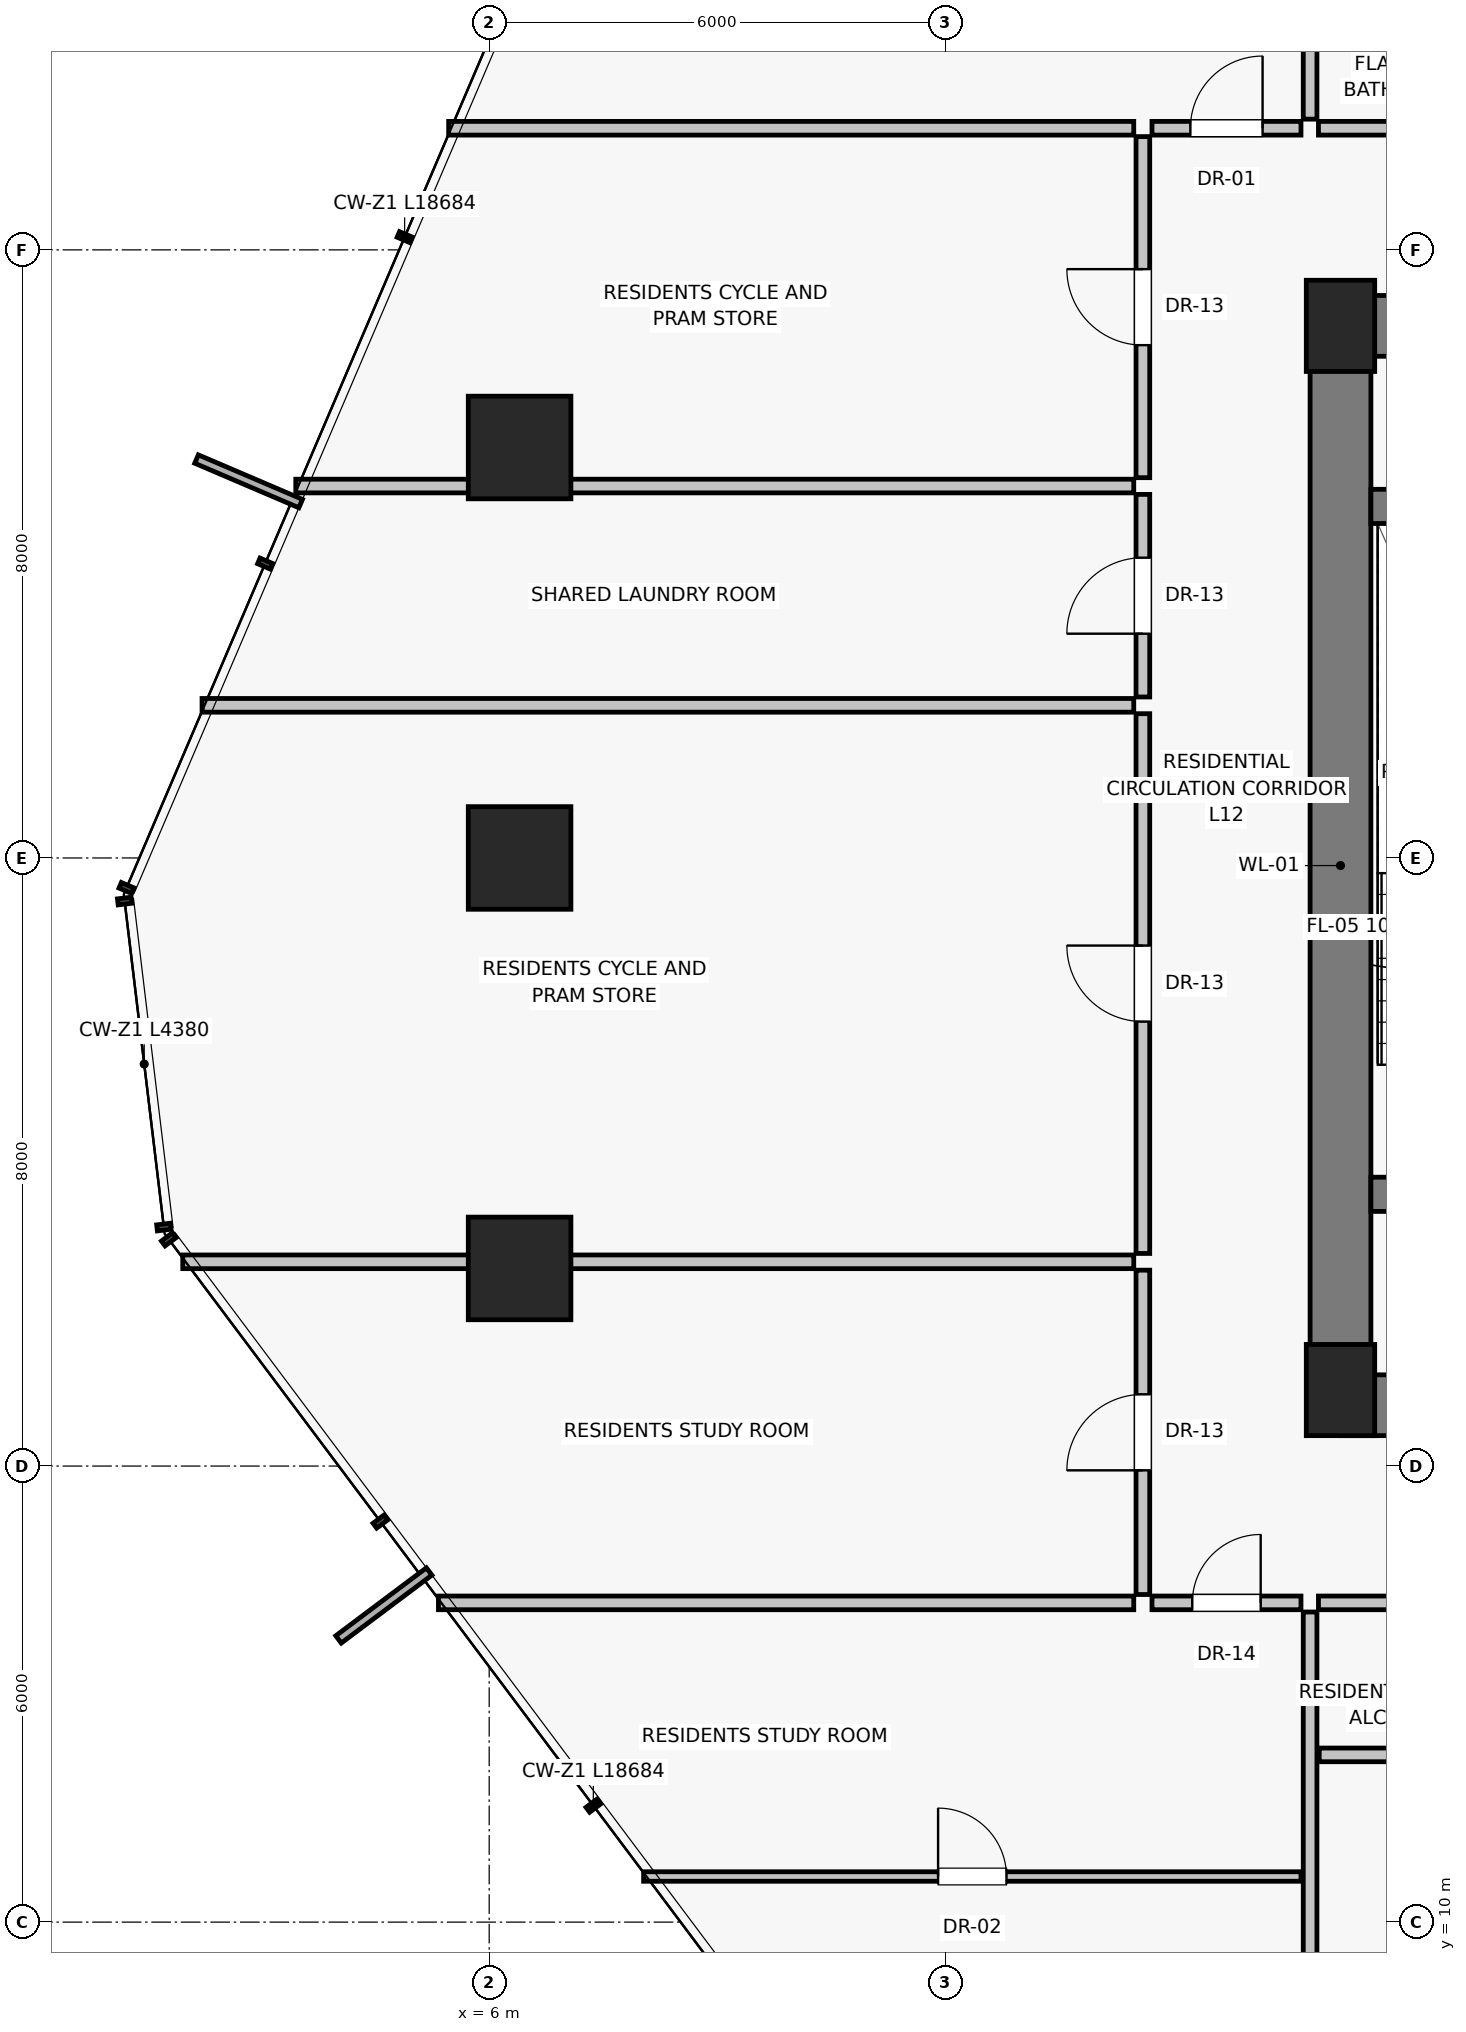
"""IFC4 building model, lengths in metres.
Left out: names, types, materials, properties, quantities, classifications, styles, units other than length and angle.
Written with IfcOpenShell. Run it as: python <this file> out.ifc"""

import sys

from ifc_helpers import new_model, si_unit, direction, frame, frame_2d, origin, origin_2d, place, context, subcontext, project, spatial, rectangle, extrude, source, transform, mapped, element, fill, save


model = new_model("IFC4")
c1 = context("Model", 3, precision=1e-05, world=origin(), true_north=direction((0.0, 1.0)))
c2 = subcontext(c1, "Body", "Model", "MODEL_VIEW")
j1 = project(units=[si_unit("LENGTHUNIT", "METRE"), si_unit("PLANEANGLEUNIT", "RADIAN")], contexts=[c1])
p1 = place(None, origin())
s1 = spatial("IfcSite", under=j1, at=p1, CompositionType="ELEMENT")
p2 = place(p1, origin())
s2 = spatial("IfcBuilding", under=s1, at=p2, CompositionType="ELEMENT")
p3 = place(p2, frame((0.0, 0.0, 46.8)))
s3 = spatial("IfcBuildingStorey", under=s2, at=p3, CompositionType="ELEMENT", Elevation=46.8)
for number, where, z_axis, x_axis in (
    (1, (17.2, 17.0, 0.0), (0.0, 0.0, 1.0), (1.0, 0.0, 0.0)),
    (2, (17.2, 31.0, 0.0), (0.0, 0.0, 1.0), (1.0, 0.0, 0.0)),
):
    element("IfcColumn", number, at=place(p3, frame(where, z_axis=z_axis, x_axis=x_axis)), inside=s3, PredefinedType="PILASTER", context=c2, shape_type="SweptSolid", body=[
        extrude(rectangle(XDim=0.9, YDim=1.2, at=origin_2d()), origin(), (0.0, 0.0, 1.0), 3.25),
    ])
for number, where, z_axis, x_axis in (
    (3, (6.4, 29.4, 0.0), (0.0, 0.0, 1.0), (1.0, 0.0, 0.0)),
    (4, (6.4, 24.0, 0.0), (0.0, 0.0, 1.0), (1.0, 0.0, 0.0)),
    (5, (6.4, 18.6, 0.0), (0.0, 0.0, 1.0), (1.0, 0.0, 0.0)),
):
    element("IfcColumn", number, at=place(p3, frame(where, z_axis=z_axis, x_axis=x_axis)), inside=s3, PredefinedType="COLUMN", context=c2, shape_type="SweptSolid", body=[
        extrude(rectangle(XDim=1.35, YDim=1.35, at=origin_2d()), origin(), (0.0, 0.0, 1.0), 3.25),
    ])
p4 = place(p3, frame((17.2, 16.8, 0.0), z_axis=(0.0, 0.0, 1.0), x_axis=(0.0, 1.0, 0.0)))
e6 = element("IfcWall", 6, at=p4, inside=s3, PredefinedType="SHEAR", context=c2, shape_type="SweptSolid", body=[
    extrude(rectangle(XDim=14.2, YDim=0.8, at=frame_2d((7.1, 0.0))), origin(), (0.0, 0.0, 1.0), 3.0),
])
p5 = place(p3, frame((17.2, 16.8, 0.0), z_axis=(0.0, 0.0, 1.0), x_axis=(1.0, 0.0, 0.0)))
e7 = element("IfcWall", 7, at=p5, inside=s3, PredefinedType="SHEAR", context=c2, shape_type="SweptSolid", body=[
    extrude(rectangle(XDim=5.85, YDim=0.8, at=frame_2d((2.925, 0.0))), origin(), (0.0, 0.0, 1.0), 3.0),
])
p6 = place(p5, frame((1.15, 0.0, 0.0)))
e8 = element("IfcOpeningElement", 8, at=p6, cuts=e7, PredefinedType="OPENING", context=c2, shape_type="SweptSolid", body=[
    extrude(rectangle(XDim=1.2, YDim=2.03, at=frame_2d((0.6, 1.015))), frame((0.0, 0.41, 0.0), z_axis=(0.0, -1.0, 0.0), x_axis=(1.0, 0.0, 0.0)), (0.0, 0.0, 1.0), 0.82),
])
p7 = place(p3, frame((17.2, 31.0, 0.0), z_axis=(0.0, 0.0, 1.0), x_axis=(1.0, 0.0, 0.0)))
e9 = element("IfcWall", 9, at=p7, inside=s3, PredefinedType="SHEAR", context=c2, shape_type="SweptSolid", body=[
    extrude(rectangle(XDim=3.8, YDim=0.8, at=frame_2d((1.9, 0.0))), origin(), (0.0, 0.0, 1.0), 3.0),
])
p8 = place(p7, frame((1.25, 0.0, 0.0)))
e10 = element("IfcOpeningElement", 10, at=p8, cuts=e9, PredefinedType="OPENING", context=c2, shape_type="SweptSolid", body=[
    extrude(rectangle(XDim=0.86, YDim=2.01, at=frame_2d((0.43, 1.005))), frame((0.0, 0.41, 0.0), z_axis=(0.0, -1.0, 0.0), x_axis=(1.0, 0.0, 0.0)), (0.0, 0.0, 1.0), 0.82),
])
p9 = place(p3, frame((17.6, 19.575, 0.0), z_axis=(0.0, 0.0, 1.0), x_axis=(1.0, 0.0, 0.0)))
e11 = element("IfcWall", 11, at=p9, inside=s3, PredefinedType="SHEAR", context=c2, shape_type="SweptSolid", body=[
    extrude(rectangle(XDim=3.425, YDim=0.45, at=frame_2d((1.712, 0.0))), origin(), (0.0, 0.0, 1.0), 3.0),
])
p10 = place(p9, frame((1.05, 0.0, 0.0)))
e12 = element("IfcOpeningElement", 12, at=p10, cuts=e11, PredefinedType="OPENING", context=c2, shape_type="SweptSolid", body=[
    extrude(rectangle(XDim=1.1, YDim=2.03, at=frame_2d((0.55, 1.015))), frame((0.0, 0.235, 0.0), z_axis=(0.0, -1.0, 0.0), x_axis=(1.0, 0.0, 0.0)), (0.0, 0.0, 1.0), 0.47),
])
p11 = place(p3, frame((17.6, 28.625, 0.0), z_axis=(0.0, 0.0, 1.0), x_axis=(1.0, 0.0, 0.0)))
e13 = element("IfcWall", 13, at=p11, inside=s3, PredefinedType="SHEAR", context=c2, shape_type="SweptSolid", body=[
    extrude(rectangle(XDim=3.425, YDim=0.45, at=frame_2d((1.712, 0.0))), origin(), (0.0, 0.0, 1.0), 3.0),
])
p12 = place(p3, frame((16.8, 14.08, 0.0), z_axis=(0.0, 0.0, 1.0), x_axis=(0.0, -1.0, 0.0)))
e14 = element("IfcWall", 14, at=p12, inside=s3, PredefinedType="PARTITIONING", context=c2, shape_type="SweptSolid", body=[
    extrude(rectangle(XDim=11.723, YDim=0.18, at=frame_2d((5.861, 0.0))), origin(), (0.0, 0.0, 1.0), 3.0),
])
p13 = place(p3, frame((16.91, 14.2, 0.0), z_axis=(0.0, 0.0, 1.0), x_axis=(1.0, 0.0, 0.0)))
e15 = element("IfcWall", 15, at=p13, inside=s3, PredefinedType="PARTITIONING", context=c2, shape_type="SweptSolid", body=[
    extrude(rectangle(XDim=4.1, YDim=0.18, at=frame_2d((2.05, 0.0))), origin(), (0.0, 0.0, 1.0), 3.0),
])
p14 = place(p13, frame((1.55, 0.0, 0.0)))
e16 = element("IfcOpeningElement", 16, at=p14, cuts=e15, PredefinedType="OPENING", context=c2, shape_type="SweptSolid", body=[
    extrude(rectangle(XDim=1.0, YDim=2.01, at=frame_2d((0.5, 1.005))), frame((0.0, 0.1, 0.0), z_axis=(0.0, -1.0, 0.0), x_axis=(1.0, 0.0, 0.0)), (0.0, 0.0, 1.0), 0.2),
])
p15 = place(p3, frame((16.92, 12.2, 0.0), z_axis=(0.0, 0.0, 1.0), x_axis=(1.0, 0.0, 0.0)))
e17 = element("IfcWall", 17, at=p15, inside=s3, PredefinedType="PARTITIONING", context=c2, shape_type="SweptSolid", body=[
    extrude(rectangle(XDim=4.1, YDim=0.18, at=frame_2d((2.05, 0.0))), origin(), (0.0, 0.0, 1.0), 3.0),
])
p16 = place(p3, frame((16.8, 33.72, 0.0), z_axis=(0.0, 0.0, 1.0), x_axis=(0.0, 1.0, 0.0)))
e18 = element("IfcWall", 18, at=p16, inside=s3, PredefinedType="PARTITIONING", context=c2, shape_type="SweptSolid", body=[
    extrude(rectangle(XDim=10.378, YDim=0.18, at=frame_2d((5.189, 0.0))), origin(), (0.0, 0.0, 1.0), 3.0),
])
p17 = place(p3, frame((16.91, 33.6, 0.0), z_axis=(0.0, 0.0, 1.0), x_axis=(1.0, 0.0, 0.0)))
e19 = element("IfcWall", 19, at=p17, inside=s3, PredefinedType="PARTITIONING", context=c2, shape_type="SweptSolid", body=[
    extrude(rectangle(XDim=5.788, YDim=0.18, at=frame_2d((2.894, 0.0))), origin(), (0.0, 0.0, 1.0), 3.0),
])
p18 = place(p17, frame((3.484, 0.0, 0.0)))
e20 = element("IfcOpeningElement", 20, at=p18, cuts=e19, PredefinedType="OPENING", context=c2, shape_type="SweptSolid", body=[
    extrude(rectangle(XDim=0.95, YDim=2.02, at=frame_2d((0.475, 1.01))), frame((0.0, 0.1, 0.0), z_axis=(0.0, -1.0, 0.0), x_axis=(1.0, 0.0, 0.0)), (0.0, 0.0, 1.0), 0.2),
])
p19 = place(p3, frame((14.48, 14.2, 0.0), z_axis=(0.0, 0.0, 1.0), x_axis=(-1.0, 0.0, 0.0)))
e21 = element("IfcWall", 21, at=p19, inside=s3, PredefinedType="PARTITIONING", context=c2, shape_type="SweptSolid", body=[
    extrude(rectangle(XDim=9.147, YDim=0.18, at=frame_2d((4.574, 0.0))), origin(), (0.0, 0.0, 1.0), 3.0),
])
p20 = place(p3, frame((14.48, 33.6, 0.0), z_axis=(0.0, 0.0, 1.0), x_axis=(-1.0, 0.0, 0.0)))
e22 = element("IfcWall", 22, at=p20, inside=s3, PredefinedType="PARTITIONING", context=c2, shape_type="SweptSolid", body=[
    extrude(rectangle(XDim=9.013, YDim=0.18, at=frame_2d((4.507, 0.0))), origin(), (0.0, 0.0, 1.0), 3.0),
])
p21 = place(p3, frame((14.6, 14.31, 0.0), z_axis=(0.0, 0.0, 1.0), x_axis=(0.0, 1.0, 0.0)))
e23 = element("IfcWall", 23, at=p21, inside=s3, PredefinedType="PARTITIONING", context=c2, shape_type="SweptSolid", body=[
    extrude(rectangle(XDim=4.267, YDim=0.18, at=frame_2d((2.133, 0.0))), origin(), (0.0, 0.0, 1.0), 3.0),
])
p22 = place(p21, frame((1.634, 0.0, 0.0)))
e24 = element("IfcOpeningElement", 24, at=p22, cuts=e23, PredefinedType="OPENING", context=c2, shape_type="SweptSolid", body=[
    extrude(rectangle(XDim=1.0, YDim=2.01, at=frame_2d((0.5, 1.005))), frame((0.0, 0.1, 0.0), z_axis=(0.0, -1.0, 0.0), x_axis=(1.0, 0.0, 0.0)), (0.0, 0.0, 1.0), 0.2),
])
p23 = place(p3, frame((14.6, 18.797, 0.0), z_axis=(0.0, 0.0, 1.0), x_axis=(0.0, 1.0, 0.0)))
e25 = element("IfcWall", 25, at=p23, inside=s3, PredefinedType="PARTITIONING", context=c2, shape_type="SweptSolid", body=[
    extrude(rectangle(XDim=7.101, YDim=0.18, at=frame_2d((3.55, 0.0))), origin(), (0.0, 0.0, 1.0), 3.0),
])
p24 = place(p23, frame((3.051, 0.0, 0.0)))
e26 = element("IfcOpeningElement", 26, at=p24, cuts=e25, PredefinedType="OPENING", context=c2, shape_type="SweptSolid", body=[
    extrude(rectangle(XDim=1.0, YDim=2.01, at=frame_2d((0.5, 1.005))), frame((0.0, 0.1, 0.0), z_axis=(0.0, -1.0, 0.0), x_axis=(1.0, 0.0, 0.0)), (0.0, 0.0, 1.0), 0.2),
])
p25 = place(p3, frame((14.48, 18.687, 0.0), z_axis=(0.0, 0.0, 1.0), x_axis=(-1.0, 0.0, 0.0)))
e27 = element("IfcWall", 27, at=p25, inside=s3, PredefinedType="PARTITIONING", context=c2, shape_type="SweptSolid", body=[
    extrude(rectangle(XDim=12.511, YDim=0.18, at=frame_2d((6.256, 0.0))), origin(), (0.0, 0.0, 1.0), 2.299),
])
p26 = place(p3, frame((14.48, 26.008, 0.0), z_axis=(0.0, 0.0, 1.0), x_axis=(-1.0, 0.0, 0.0)))
e28 = element("IfcWall", 28, at=p26, inside=s3, PredefinedType="PARTITIONING", context=c2, shape_type="SweptSolid", body=[
    extrude(rectangle(XDim=12.258, YDim=0.18, at=frame_2d((6.129, 0.0))), origin(), (0.0, 0.0, 1.0), 3.0),
])
p27 = place(p3, frame((14.6, 26.118, 0.0), z_axis=(0.0, 0.0, 1.0), x_axis=(0.0, 1.0, 0.0)))
e29 = element("IfcWall", 29, at=p27, inside=s3, PredefinedType="PARTITIONING", context=c2, shape_type="SweptSolid", body=[
    extrude(rectangle(XDim=2.665, YDim=0.18, at=frame_2d((1.333, 0.0))), origin(), (0.0, 0.0, 1.0), 3.0),
])
p28 = place(p27, frame((0.833, 0.0, 0.0)))
e30 = element("IfcOpeningElement", 30, at=p28, cuts=e29, PredefinedType="OPENING", context=c2, shape_type="SweptSolid", body=[
    extrude(rectangle(XDim=1.0, YDim=2.01, at=frame_2d((0.5, 1.005))), frame((0.0, 0.1, 0.0), z_axis=(0.0, -1.0, 0.0), x_axis=(1.0, 0.0, 0.0)), (0.0, 0.0, 1.0), 0.2),
])
p29 = place(p3, frame((14.6, 29.003, 0.0), z_axis=(0.0, 0.0, 1.0), x_axis=(0.0, 1.0, 0.0)))
e31 = element("IfcWall", 31, at=p29, inside=s3, PredefinedType="PARTITIONING", context=c2, shape_type="SweptSolid", body=[
    extrude(rectangle(XDim=4.487, YDim=0.18, at=frame_2d((2.244, 0.0))), origin(), (0.0, 0.0, 1.0), 3.0),
])
p30 = place(p29, frame((1.743, 0.0, 0.0)))
e32 = element("IfcOpeningElement", 32, at=p30, cuts=e31, PredefinedType="OPENING", context=c2, shape_type="SweptSolid", body=[
    extrude(rectangle(XDim=1.0, YDim=2.01, at=frame_2d((0.5, 1.005))), frame((0.0, 0.1, 0.0), z_axis=(0.0, -1.0, 0.0), x_axis=(1.0, 0.0, 0.0)), (0.0, 0.0, 1.0), 0.2),
])
p31 = place(p3, frame((14.48, 28.893, 0.0), z_axis=(0.0, 0.0, 1.0), x_axis=(-1.0, 0.0, 0.0)))
e33 = element("IfcWall", 33, at=p31, inside=s3, PredefinedType="PARTITIONING", context=c2, shape_type="SweptSolid", body=[
    extrude(rectangle(XDim=11.025, YDim=0.18, at=frame_2d((5.512, 0.0))), origin(), (0.0, 0.0, 1.0), 2.299),
])
p32 = place(p3, frame((14.72, 14.2, 0.0), z_axis=(0.0, 0.0, 1.0), x_axis=(1.0, 0.0, 0.0)))
e34 = element("IfcWall", 34, at=p32, inside=s3, PredefinedType="PARTITIONING", context=c2, shape_type="SweptSolid", body=[
    extrude(rectangle(XDim=1.96, YDim=0.18, at=frame_2d((0.98, 0.0))), origin(), (0.0, 0.0, 1.0), 3.0),
])
p33 = place(p32, frame((0.53, 0.0, 0.0)))
e35 = element("IfcOpeningElement", 35, at=p33, cuts=e34, PredefinedType="OPENING", context=c2, shape_type="SweptSolid", body=[
    extrude(rectangle(XDim=0.9, YDim=2.01, at=frame_2d((0.45, 1.005))), frame((0.0, 0.1, 0.0), z_axis=(0.0, -1.0, 0.0), x_axis=(1.0, 0.0, 0.0)), (0.0, 0.0, 1.0), 0.2),
])
p34 = place(p3, frame((8.031, 10.6, 0.0), z_axis=(0.0, 0.0, 1.0), x_axis=(1.0, 0.0, 0.0)))
e36 = element("IfcWall", 36, at=p34, inside=s3, PredefinedType="PARTITIONING", context=c2, shape_type="SweptSolid", body=[
    extrude(rectangle(XDim=8.648, YDim=0.125, at=frame_2d((4.324, 0.0))), origin(), (0.0, 0.0, 1.0), 3.0),
])
p35 = place(p34, frame((3.874, 0.0, 0.0)))
e37 = element("IfcOpeningElement", 37, at=p35, cuts=e36, PredefinedType="OPENING", context=c2, shape_type="SweptSolid", body=[
    extrude(rectangle(XDim=0.9, YDim=2.01, at=frame_2d((0.45, 1.005))), frame((0.0, 0.073, 0.0), z_axis=(0.0, -1.0, 0.0), x_axis=(1.0, 0.0, 0.0)), (0.0, 0.0, 1.0), 0.145),
])
p36 = place(p3, frame((14.72, 33.6, 0.0), z_axis=(0.0, 0.0, 1.0), x_axis=(1.0, 0.0, 0.0)))
e38 = element("IfcWall", 38, at=p36, inside=s3, PredefinedType="PARTITIONING", context=c2, shape_type="SweptSolid", body=[
    extrude(rectangle(XDim=1.96, YDim=0.18, at=frame_2d((0.98, 0.0))), origin(), (0.0, 0.0, 1.0), 3.0),
])
p37 = place(p36, frame((0.505, 0.0, 0.0)))
e39 = element("IfcOpeningElement", 39, at=p37, cuts=e38, PredefinedType="OPENING", context=c2, shape_type="SweptSolid", body=[
    extrude(rectangle(XDim=0.95, YDim=2.02, at=frame_2d((0.475, 1.01))), frame((0.0, 0.1, 0.0), z_axis=(0.0, -1.0, 0.0), x_axis=(1.0, 0.0, 0.0)), (0.0, 0.0, 1.0), 0.2),
])
m1 = source(origin(), c2, "Body", "SweptSolid", [
    extrude(rectangle(XDim=1.0, YDim=2.01, at=frame_2d((0.5, 1.005))), frame((0.0, 0.025, 0.0), z_axis=(0.0, -1.0, 0.0), x_axis=(1.0, 0.0, 0.0)), (0.0, 0.0, 1.0), 0.05),
])
p38 = place(p22, origin())
e40 = element("IfcDoor", 40, at=p38, inside=s3, OperationType="SINGLE_SWING_LEFT", PredefinedType="DOOR", context=c2, shape_type="MappedRepresentation", body=[
    mapped(m1, transform((0.0, 0.0, 0.0), scale=1.0)),
])
fill(e24, e40)
p39 = place(p24, origin())
e41 = element("IfcDoor", 41, at=p39, inside=s3, OperationType="SINGLE_SWING_RIGHT", PredefinedType="DOOR", context=c2, shape_type="MappedRepresentation", body=[
    mapped(m1, transform((0.0, 0.0, 0.0), scale=1.0)),
])
fill(e26, e41)
p40 = place(p28, origin())
e42 = element("IfcDoor", 42, at=p40, inside=s3, OperationType="SINGLE_SWING_LEFT", PredefinedType="DOOR", context=c2, shape_type="MappedRepresentation", body=[
    mapped(m1, transform((0.0, 0.0, 0.0), scale=1.0)),
])
fill(e30, e42)
p41 = place(p30, origin())
e43 = element("IfcDoor", 43, at=p41, inside=s3, OperationType="SINGLE_SWING_RIGHT", PredefinedType="DOOR", context=c2, shape_type="MappedRepresentation", body=[
    mapped(m1, transform((0.0, 0.0, 0.0), scale=1.0)),
])
fill(e32, e43)
m2 = source(origin(), c2, "Body", "SweptSolid", [
    extrude(rectangle(XDim=0.9, YDim=2.01, at=frame_2d((0.45, 1.005))), frame((0.0, 0.025, 0.0), z_axis=(0.0, -1.0, 0.0), x_axis=(1.0, 0.0, 0.0)), (0.0, 0.0, 1.0), 0.05),
])
p42 = place(p33, origin())
e44 = element("IfcDoor", 44, at=p42, inside=s3, OperationType="SINGLE_SWING_RIGHT", PredefinedType="DOOR", context=c2, shape_type="MappedRepresentation", body=[
    mapped(m2, transform((0.0, 0.0, 0.0), scale=1.0)),
])
fill(e35, e44)
p43 = place(p35, origin())
e45 = element("IfcDoor", 45, at=p43, inside=s3, OperationType="SINGLE_SWING_LEFT", PredefinedType="DOOR", context=c2, shape_type="MappedRepresentation", body=[
    mapped(m2, transform((0.0, 0.0, 0.0), scale=1.0)),
])
fill(e37, e45)
m3 = source(origin(), c2, "Body", "SweptSolid", [
    extrude(rectangle(XDim=0.95, YDim=2.02, at=frame_2d((0.475, 1.01))), frame((0.0, 0.025, 0.0), z_axis=(0.0, -1.0, 0.0), x_axis=(1.0, 0.0, 0.0)), (0.0, 0.0, 1.0), 0.05),
])
p44 = place(p37, origin())
e46 = element("IfcDoor", 46, at=p44, inside=s3, OperationType="SINGLE_SWING_RIGHT", PredefinedType="DOOR", context=c2, shape_type="MappedRepresentation", body=[
    mapped(m3, transform((0.0, 0.0, 0.0), scale=1.0)),
])
fill(e39, e46)
save(model, sys.argv[1])
